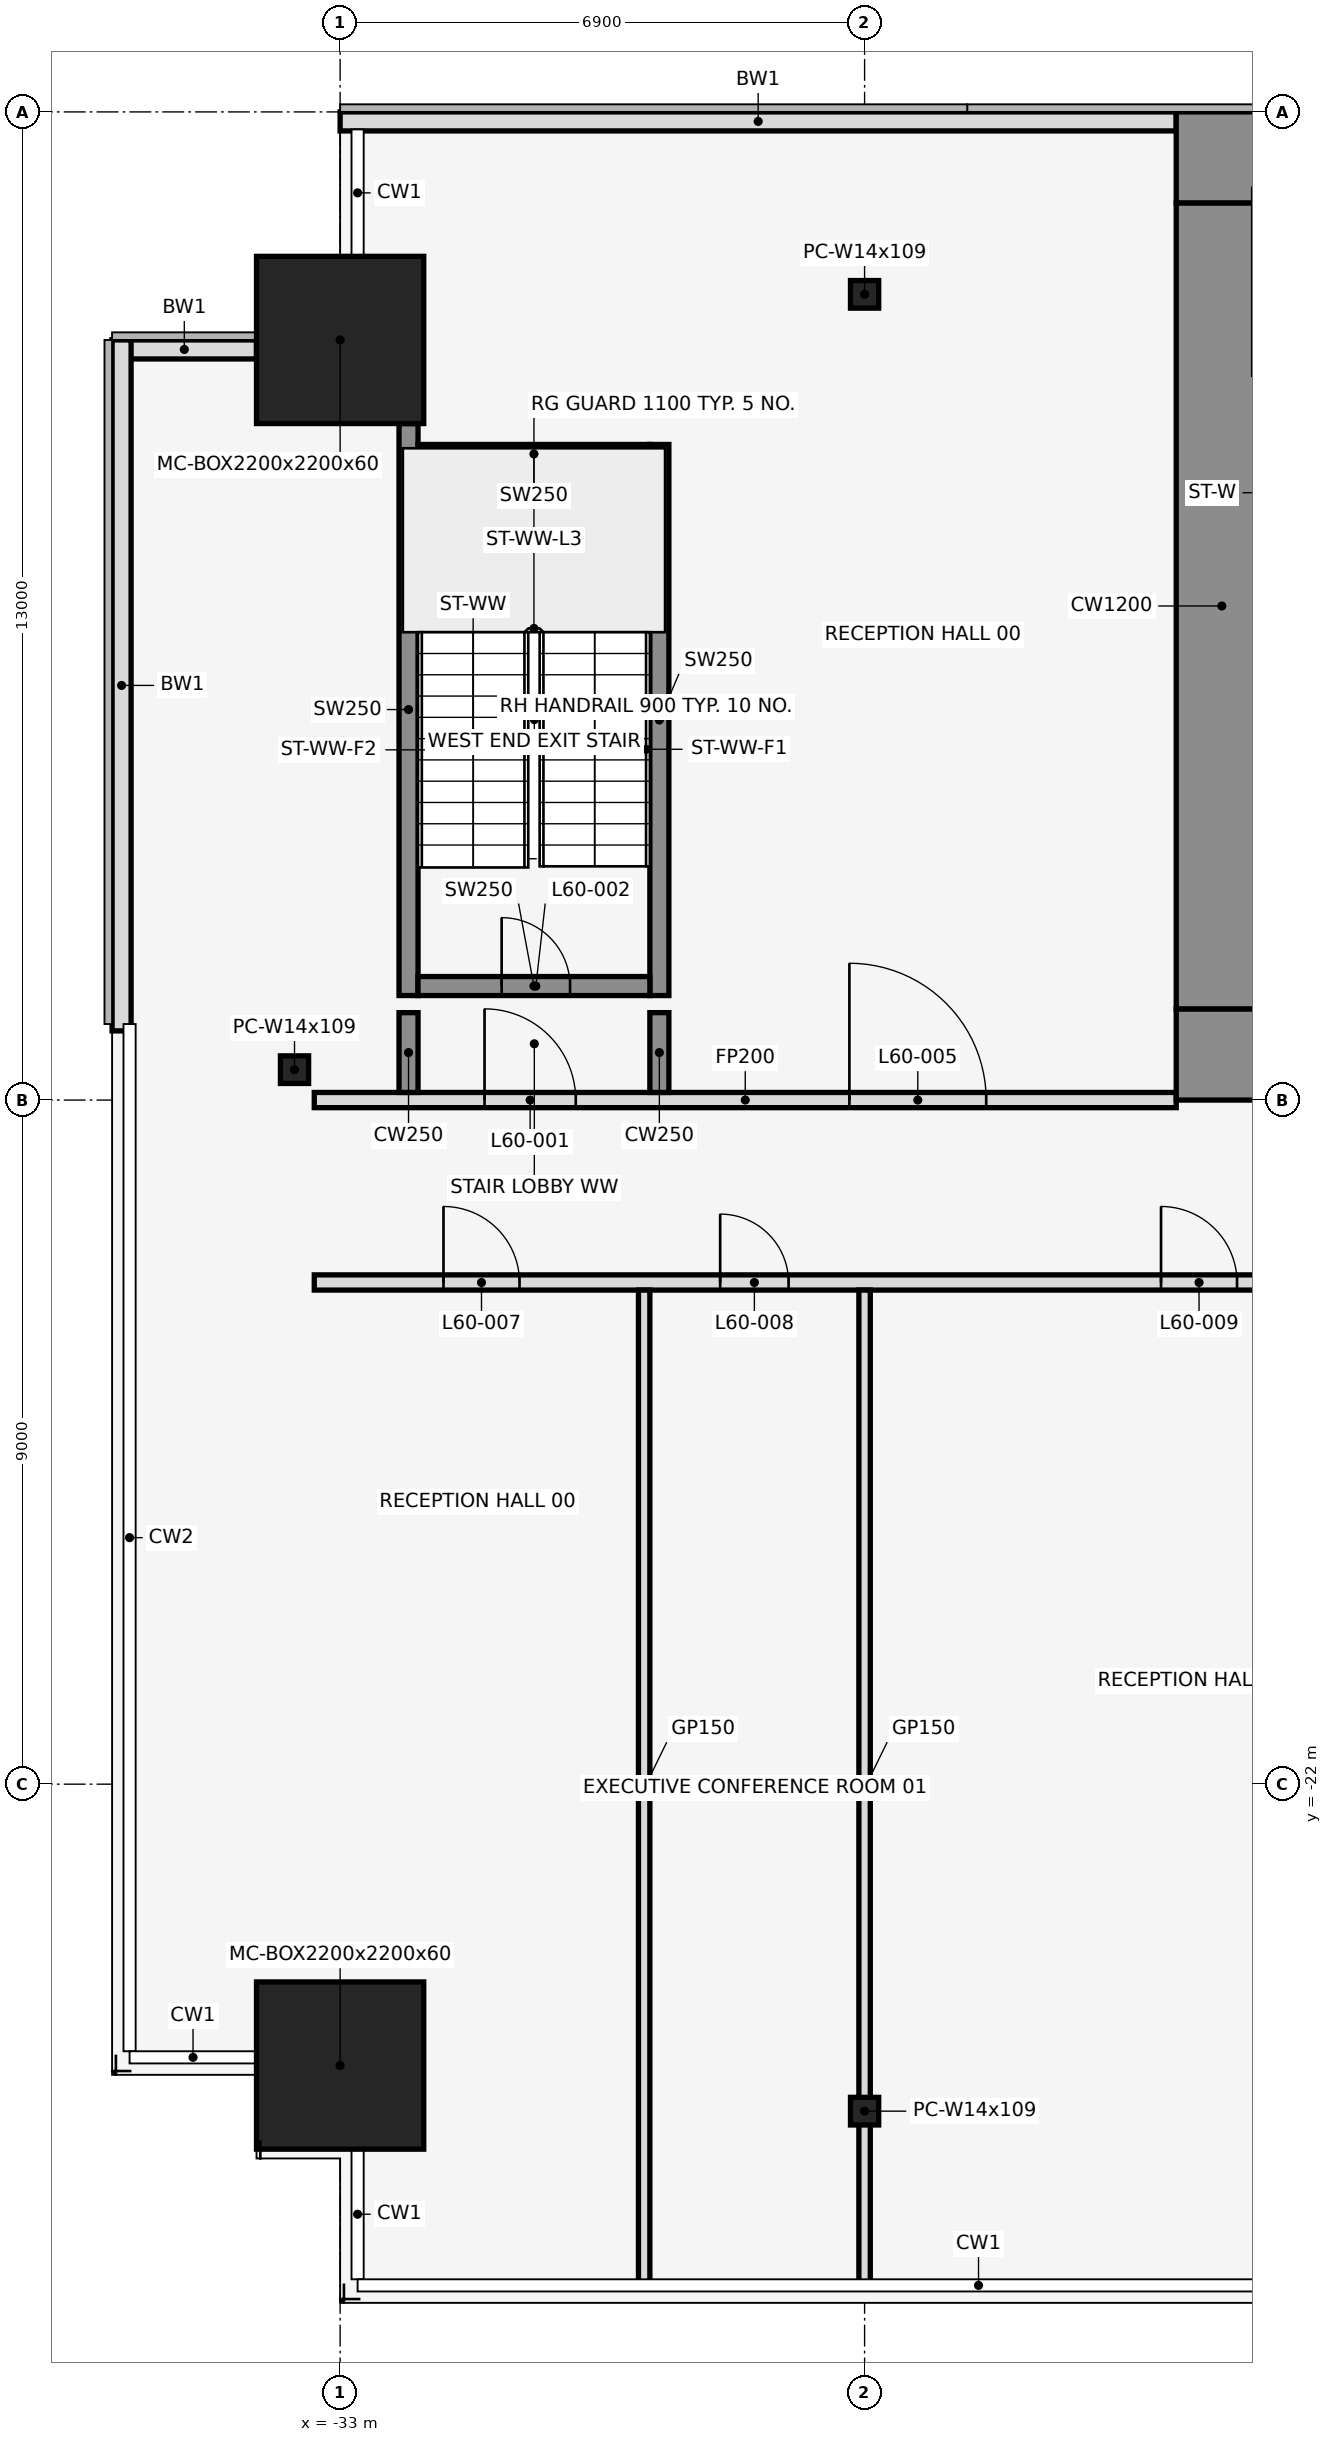
"""IFC4 building model, lengths in metres.
Left out: names, types, materials, properties, quantities, classifications, styles, units other than length and angle.
Written with IfcOpenShell. Run it as: python <this file> out.ifc"""

import sys

from ifc_helpers import new_model, si_unit, direction, frame, frame_2d, origin, origin_2d, place, context, subcontext, project, spatial, rectangle, hollow_rectangle, i_section, extrude, element, fill, save


model = new_model("IFC4")
c1 = context("Model", 3, precision=1e-05, world=origin(), true_north=direction((0.0, 1.0)))
c2 = subcontext(c1, "Body", "Model", "MODEL_VIEW")
j1 = project(units=[si_unit("LENGTHUNIT", "METRE"), si_unit("PLANEANGLEUNIT", "RADIAN")], contexts=[c1])
p1 = place(None, origin())
s1 = spatial("IfcSite", under=j1, at=p1, CompositionType="ELEMENT")
p2 = place(p1, origin())
s2 = spatial("IfcBuilding", under=s1, at=p2, CompositionType="ELEMENT")
p3 = place(p2, frame((0.0, 0.0, 266.6)))
s3 = spatial("IfcBuildingStorey", under=s2, at=p3, CompositionType="ELEMENT", Elevation=266.6)
for number, where, z_axis, x_axis in (
    (1, (-33.0, -25.702, 0.0), (0.0, 0.0, 1.0), (1.0, 0.0, 0.0)),
    (2, (-33.0, -3.0, 0.0), (0.0, 0.0, 1.0), (1.0, 0.0, 0.0)),
):
    element("IfcColumn", number, at=place(p3, frame(where, z_axis=z_axis, x_axis=x_axis)), inside=s3, PredefinedType="COLUMN", context=c2, shape_type="SweptSolid", body=[
        extrude(hollow_rectangle(XDim=2.2, YDim=2.2, WallThickness=0.06, at=origin_2d()), origin(), (0.0, 0.0, 1.0), 4.2),
    ])
for number, where, z_axis, x_axis in (
    (3, (-26.1, -26.302, 0.0), (0.0, 0.0, 1.0), (1.0, 0.0, 0.0)),
    (4, (-26.1, -2.4, 0.0), (0.0, 0.0, 1.0), (1.0, 0.0, 0.0)),
    (5, (-33.6, -12.6, 0.0), (0.0, 0.0, 1.0), (1.0, 0.0, 0.0)),
):
    element("IfcColumn", number, at=place(p3, frame(where, z_axis=z_axis, x_axis=x_axis)), inside=s3, PredefinedType="COLUMN", context=c2, shape_type="SweptSolid", body=[
        extrude(i_section(OverallWidth=0.371, OverallDepth=0.363, WebThickness=0.013, FlangeThickness=0.022, at=origin_2d()), origin(), (0.0, 0.0, 1.0), 4.2),
    ])
p4 = place(p3, frame((-22.0, -0.125, 0.0), z_axis=(0.0, 0.0, 1.0), x_axis=(-1.0, 0.0, 0.0)))
e6 = element("IfcWall", 6, at=p4, inside=s3, PredefinedType="STANDARD", context=c2, shape_type="SweptSolid", body=[
    extrude(rectangle(XDim=11.0, YDim=0.25, at=frame_2d((5.5, 0.0))), origin(), (0.0, 0.0, 1.0), 4.05),
])
p5 = place(p3, frame((-34.1, -3.125, 0.0), z_axis=(0.0, 0.0, 1.0), x_axis=(-1.0, 0.0, 0.0)))
e7 = element("IfcWall", 7, at=p5, inside=s3, PredefinedType="STANDARD", context=c2, shape_type="SweptSolid", body=[
    extrude(rectangle(XDim=1.9, YDim=0.25, at=frame_2d((0.95, 0.0))), origin(), (0.0, 0.0, 1.0), 4.05),
])
p6 = place(p3, frame((-35.875, -3.0, 0.0), z_axis=(0.0, 0.0, 1.0), x_axis=(0.0, -1.0, 0.0)))
e8 = element("IfcWall", 8, at=p6, inside=s3, PredefinedType="STANDARD", context=c2, shape_type="SweptSolid", body=[
    extrude(rectangle(XDim=9.09, YDim=0.25, at=frame_2d((4.545, 0.0))), origin(), (0.0, 0.0, 1.0), 4.05),
])
p7 = place(p3, frame((-32.1, -11.625, 0.0), z_axis=(0.0, 0.0, 1.0), x_axis=(0.0, 1.0, 0.0)))
e9 = element("IfcWall", 9, at=p7, inside=s3, PredefinedType="SHEAR", context=c2, shape_type="SweptSolid", body=[
    extrude(rectangle(XDim=7.525, YDim=0.25, at=frame_2d((3.762, 0.0))), origin(), (0.0, 0.0, 1.0), 4.2),
])
p8 = place(p3, frame((-28.8, -11.625, 0.0), z_axis=(0.0, 0.0, 1.0), x_axis=(0.0, 1.0, 0.0)))
e10 = element("IfcWall", 10, at=p8, inside=s3, PredefinedType="SHEAR", context=c2, shape_type="SweptSolid", body=[
    extrude(rectangle(XDim=7.25, YDim=0.25, at=frame_2d((3.625, 0.0))), origin(), (0.0, 0.0, 1.0), 4.2),
])
p9 = place(p3, frame((-31.975, -11.5, 0.0), z_axis=(0.0, 0.0, 1.0), x_axis=(1.0, 0.0, 0.0)))
e11 = element("IfcWall", 11, at=p9, inside=s3, PredefinedType="SHEAR", context=c2, shape_type="SweptSolid", body=[
    extrude(rectangle(XDim=3.05, YDim=0.25, at=frame_2d((1.525, 0.0))), origin(), (0.0, 0.0, 1.0), 4.2),
])
p10 = place(p9, frame((1.1, 0.0, 0.0)))
e12 = element("IfcOpeningElement", 12, at=p10, cuts=e11, PredefinedType="OPENING", context=c2, shape_type="SweptSolid", body=[
    extrude(rectangle(XDim=0.9, YDim=2.1, at=frame_2d((0.45, 1.05))), frame((0.0, 0.137, 0.0), z_axis=(0.0, -1.0, 0.0), x_axis=(1.0, 0.0, 0.0)), (0.0, 0.0, 1.0), 0.274),
])
p11 = place(p3, frame((-31.975, -4.5, 0.0), z_axis=(0.0, 0.0, 1.0), x_axis=(1.0, 0.0, 0.0)))
e13 = element("IfcWall", 13, at=p11, inside=s3, PredefinedType="SHEAR", context=c2, shape_type="SweptSolid", body=[
    extrude(rectangle(XDim=3.05, YDim=0.25, at=frame_2d((1.525, 0.0))), origin(), (0.0, 0.0, 1.0), 4.2),
])
p12 = place(p3, frame((-33.34, -15.4, 0.0), z_axis=(0.0, 0.0, 1.0), x_axis=(1.0, 0.0, 0.0)))
e14 = element("IfcWall", 14, at=p12, inside=s3, PredefinedType="PARTITIONING", context=c2, shape_type="SweptSolid", body=[
    extrude(rectangle(XDim=31.94, YDim=0.2, at=frame_2d((15.97, 0.0))), origin(), (0.0, 0.0, 1.0), 3.118),
])
p13 = place(p12, frame((1.7, 0.0, 0.0)))
e15 = element("IfcOpeningElement", 15, at=p13, cuts=e14, PredefinedType="OPENING", context=c2, shape_type="SweptSolid", body=[
    extrude(rectangle(XDim=1.0, YDim=2.1, at=frame_2d((0.5, 1.05))), frame((0.0, 0.112, 0.0), z_axis=(0.0, -1.0, 0.0), x_axis=(1.0, 0.0, 0.0)), (0.0, 0.0, 1.0), 0.224),
])
p14 = place(p12, frame((5.34, 0.0, 0.0)))
e16 = element("IfcOpeningElement", 16, at=p14, cuts=e14, PredefinedType="OPENING", context=c2, shape_type="SweptSolid", body=[
    extrude(rectangle(XDim=0.9, YDim=2.1, at=frame_2d((0.45, 1.05))), frame((0.0, 0.112, 0.0), z_axis=(0.0, -1.0, 0.0), x_axis=(1.0, 0.0, 0.0)), (0.0, 0.0, 1.0), 0.224),
])
p15 = place(p12, frame((11.14, 0.0, 0.0)))
e17 = element("IfcOpeningElement", 17, at=p15, cuts=e14, PredefinedType="OPENING", context=c2, shape_type="SweptSolid", body=[
    extrude(rectangle(XDim=1.0, YDim=2.1, at=frame_2d((0.5, 1.05))), frame((0.0, 0.112, 0.0), z_axis=(0.0, -1.0, 0.0), x_axis=(1.0, 0.0, 0.0)), (0.0, 0.0, 1.0), 0.224),
])
p16 = place(p12, frame((18.34, 0.0, 0.0)))
e18 = element("IfcOpeningElement", 18, at=p16, cuts=e14, PredefinedType="OPENING", context=c2, shape_type="SweptSolid", body=[
    extrude(rectangle(XDim=1.0, YDim=2.1, at=frame_2d((0.5, 1.05))), frame((0.0, 0.112, 0.0), z_axis=(0.0, -1.0, 0.0), x_axis=(1.0, 0.0, 0.0)), (0.0, 0.0, 1.0), 0.224),
])
p17 = place(p3, frame((-33.34, -13.0, 0.0), z_axis=(0.0, 0.0, 1.0), x_axis=(1.0, 0.0, 0.0)))
e19 = element("IfcWall", 19, at=p17, inside=s3, PredefinedType="PARTITIONING", context=c2, shape_type="SweptSolid", body=[
    extrude(rectangle(XDim=11.34, YDim=0.2, at=frame_2d((5.67, 0.0))), origin(), (0.0, 0.0, 1.0), 3.118),
])
p18 = place(p17, frame((2.24, 0.0, 0.0)))
e20 = element("IfcOpeningElement", 20, at=p18, cuts=e19, PredefinedType="OPENING", context=c2, shape_type="SweptSolid", body=[
    extrude(rectangle(XDim=1.2, YDim=2.1, at=frame_2d((0.6, 1.05))), frame((0.0, 0.112, 0.0), z_axis=(0.0, -1.0, 0.0), x_axis=(1.0, 0.0, 0.0)), (0.0, 0.0, 1.0), 0.224),
])
p19 = place(p17, frame((7.04, 0.0, 0.0)))
e21 = element("IfcOpeningElement", 21, at=p19, cuts=e19, PredefinedType="OPENING", context=c2, shape_type="SweptSolid", body=[
    extrude(rectangle(XDim=1.8, YDim=2.1, at=frame_2d((0.9, 1.05))), frame((0.0, 0.112, 0.0), z_axis=(0.0, -1.0, 0.0), x_axis=(1.0, 0.0, 0.0)), (0.0, 0.0, 1.0), 0.224),
])
p20 = place(p3, frame((-32.1, -12.9, 0.0), z_axis=(0.0, 0.0, 1.0), x_axis=(0.0, 1.0, 0.0)))
e22 = element("IfcWall", 22, at=p20, inside=s3, PredefinedType="SHEAR", context=c2, shape_type="SweptSolid", body=[
    extrude(rectangle(XDim=1.05, YDim=0.25, at=frame_2d((0.525, 0.0))), origin(), (0.0, 0.0, 1.0), 4.2),
])
p21 = place(p3, frame((-29.0, -28.61, 0.0), z_axis=(0.0, 0.0, 1.0), x_axis=(0.0, 1.0, 0.0)))
e23 = element("IfcWall", 23, at=p21, inside=s3, PredefinedType="PARTITIONING", context=c2, shape_type="SweptSolid", body=[
    extrude(rectangle(XDim=13.11, YDim=0.15, at=frame_2d((6.555, 0.0))), origin(), (0.0, 0.0, 1.0), 3.118),
])
p22 = place(p3, frame((-28.8, -12.9, 0.0), z_axis=(0.0, 0.0, 1.0), x_axis=(0.0, 1.0, 0.0)))
e24 = element("IfcWall", 24, at=p22, inside=s3, PredefinedType="SHEAR", context=c2, shape_type="SweptSolid", body=[
    extrude(rectangle(XDim=1.05, YDim=0.25, at=frame_2d((0.525, 0.0))), origin(), (0.0, 0.0, 1.0), 4.2),
])
p23 = place(p3, frame((-26.1, -28.61, 0.0), z_axis=(0.0, 0.0, 1.0), x_axis=(0.0, 1.0, 0.0)))
e25 = element("IfcWall", 25, at=p23, inside=s3, PredefinedType="PARTITIONING", context=c2, shape_type="SweptSolid", body=[
    extrude(rectangle(XDim=13.11, YDim=0.15, at=frame_2d((6.555, 0.0))), origin(), (0.0, 0.0, 1.0), 3.118),
])
p24 = place(p3, frame((-22.0, -0.6, 0.0), z_axis=(0.0, 0.0, 1.0), x_axis=(1.0, 0.0, 0.0)))
e26 = element("IfcWall", 26, at=p24, inside=s3, PredefinedType="SHEAR", context=c2, shape_type="SweptSolid", body=[
    extrude(rectangle(XDim=44.0, YDim=1.2, at=frame_2d((22.0, 0.0))), origin(), (0.0, 0.0, 1.0), 4.2),
])
p25 = place(p24, frame((18.55, 0.0, 0.0)))
e27 = element("IfcOpeningElement", 27, at=p25, cuts=e26, PredefinedType="OPENING", context=c2, shape_type="SweptSolid", body=[
    extrude(rectangle(XDim=0.9, YDim=2.1, at=frame_2d((0.45, 1.05))), frame((0.0, 0.612, 0.0), z_axis=(0.0, -1.0, 0.0), x_axis=(1.0, 0.0, 0.0)), (0.0, 0.0, 1.0), 1.224),
])
p26 = place(p24, frame((24.55, 0.0, 0.0)))
e28 = element("IfcOpeningElement", 28, at=p26, cuts=e26, PredefinedType="OPENING", context=c2, shape_type="SweptSolid", body=[
    extrude(rectangle(XDim=0.9, YDim=2.1, at=frame_2d((0.45, 1.05))), frame((0.0, 0.612, 0.0), z_axis=(0.0, -1.0, 0.0), x_axis=(1.0, 0.0, 0.0)), (0.0, 0.0, 1.0), 1.224),
])
p27 = place(p3, frame((-22.0, -12.4, 0.0), z_axis=(0.0, 0.0, 1.0), x_axis=(1.0, 0.0, 0.0)))
e29 = element("IfcWall", 29, at=p27, inside=s3, PredefinedType="SHEAR", context=c2, shape_type="SweptSolid", body=[
    extrude(rectangle(XDim=44.0, YDim=1.2, at=frame_2d((22.0, 0.0))), origin(), (0.0, 0.0, 1.0), 4.2),
])
p28 = place(p27, frame((2.2, 0.0, 0.0)))
e30 = element("IfcOpeningElement", 30, at=p28, cuts=e29, PredefinedType="OPENING", context=c2, shape_type="SweptSolid", body=[
    extrude(rectangle(XDim=1.2, YDim=2.1, at=frame_2d((0.6, 1.05))), frame((0.0, 0.612, 0.0), z_axis=(0.0, -1.0, 0.0), x_axis=(1.0, 0.0, 0.0)), (0.0, 0.0, 1.0), 1.224),
])
p29 = place(p27, frame((21.4, 0.0, 0.0)))
e31 = element("IfcOpeningElement", 31, at=p29, cuts=e29, PredefinedType="OPENING", context=c2, shape_type="SweptSolid", body=[
    extrude(rectangle(XDim=1.2, YDim=2.1, at=frame_2d((0.6, 1.05))), frame((0.0, 0.612, 0.0), z_axis=(0.0, -1.0, 0.0), x_axis=(1.0, 0.0, 0.0)), (0.0, 0.0, 1.0), 1.224),
])
p30 = place(p27, frame((40.6, 0.0, 0.0)))
e32 = element("IfcOpeningElement", 32, at=p30, cuts=e29, PredefinedType="OPENING", context=c2, shape_type="SweptSolid", body=[
    extrude(rectangle(XDim=1.2, YDim=2.1, at=frame_2d((0.6, 1.05))), frame((0.0, 0.612, 0.0), z_axis=(0.0, -1.0, 0.0), x_axis=(1.0, 0.0, 0.0)), (0.0, 0.0, 1.0), 1.224),
])
p31 = place(p27, frame((16.0, 0.0, 0.0)))
e33 = element("IfcOpeningElement", 33, at=p31, cuts=e29, PredefinedType="OPENING", context=c2, shape_type="SweptSolid", body=[
    extrude(rectangle(XDim=1.8, YDim=2.1, at=frame_2d((0.9, 1.05))), frame((0.0, 0.612, 0.0), z_axis=(0.0, -1.0, 0.0), x_axis=(1.0, 0.0, 0.0)), (0.0, 0.0, 1.0), 1.224),
])
p32 = place(p27, frame((6.3, 0.0, 0.0)))
e34 = element("IfcOpeningElement", 34, at=p32, cuts=e29, PredefinedType="OPENING", context=c2, shape_type="SweptSolid", body=[
    extrude(rectangle(XDim=1.2, YDim=2.1, at=frame_2d((0.6, 1.05))), frame((0.0, 0.612, 0.0), z_axis=(0.0, -1.0, 0.0), x_axis=(1.0, 0.0, 0.0)), (0.0, 0.0, 1.0), 1.224),
])
p33 = place(p27, frame((26.2, 0.0, 0.0)))
e35 = element("IfcOpeningElement", 35, at=p33, cuts=e29, PredefinedType="OPENING", context=c2, shape_type="SweptSolid", body=[
    extrude(rectangle(XDim=1.8, YDim=2.1, at=frame_2d((0.9, 1.05))), frame((0.0, 0.612, 0.0), z_axis=(0.0, -1.0, 0.0), x_axis=(1.0, 0.0, 0.0)), (0.0, 0.0, 1.0), 1.224),
])
p34 = place(p27, frame((36.5, 0.0, 0.0)))
e36 = element("IfcOpeningElement", 36, at=p34, cuts=e29, PredefinedType="OPENING", context=c2, shape_type="SweptSolid", body=[
    extrude(rectangle(XDim=1.2, YDim=2.1, at=frame_2d((0.6, 1.05))), frame((0.0, 0.612, 0.0), z_axis=(0.0, -1.0, 0.0), x_axis=(1.0, 0.0, 0.0)), (0.0, 0.0, 1.0), 1.224),
])
p35 = place(p3, frame((-21.4, -11.8, 0.0), z_axis=(0.0, 0.0, 1.0), x_axis=(0.0, 1.0, 0.0)))
e37 = element("IfcWall", 37, at=p35, inside=s3, PredefinedType="SHEAR", context=c2, shape_type="SweptSolid", body=[
    extrude(rectangle(XDim=10.6, YDim=1.2, at=frame_2d((5.3, 0.0))), origin(), (0.0, 0.0, 1.0), 4.2),
])
p36 = place(p18, origin())
e38 = element("IfcDoor", 38, at=p36, inside=s3, OperationType="SINGLE_SWING_LEFT", PredefinedType="DOOR", context=c2, shape_type="SweptSolid", body=[
    extrude(rectangle(XDim=1.2, YDim=2.1, at=frame_2d((0.6, 1.05))), frame((0.0, 0.025, 0.0), z_axis=(0.0, -1.0, 0.0), x_axis=(1.0, 0.0, 0.0)), (0.0, 0.0, 1.0), 0.05),
])
fill(e20, e38)
p37 = place(p10, origin())
e39 = element("IfcDoor", 39, at=p37, inside=s3, OperationType="SINGLE_SWING_LEFT", PredefinedType="DOOR", context=c2, shape_type="SweptSolid", body=[
    extrude(rectangle(XDim=0.9, YDim=2.1, at=frame_2d((0.45, 1.05))), frame((0.0, 0.025, 0.0), z_axis=(0.0, -1.0, 0.0), x_axis=(1.0, 0.0, 0.0)), (0.0, 0.0, 1.0), 0.05),
])
fill(e12, e39)
p38 = place(p19, origin())
e40 = element("IfcDoor", 40, at=p38, inside=s3, OperationType="SINGLE_SWING_LEFT", PredefinedType="DOOR", context=c2, shape_type="SweptSolid", body=[
    extrude(rectangle(XDim=1.8, YDim=2.1, at=frame_2d((0.9, 1.05))), frame((0.0, 0.025, 0.0), z_axis=(0.0, -1.0, 0.0), x_axis=(1.0, 0.0, 0.0)), (0.0, 0.0, 1.0), 0.05),
])
fill(e21, e40)
p39 = place(p13, frame((1.0, 0.0, 0.0), z_axis=(0.0, 0.0, 1.0), x_axis=(-1.0, 0.0, 0.0)))
e41 = element("IfcDoor", 41, at=p39, inside=s3, OperationType="SINGLE_SWING_LEFT", PredefinedType="DOOR", context=c2, shape_type="SweptSolid", body=[
    extrude(rectangle(XDim=1.0, YDim=2.1, at=frame_2d((0.5, 1.05))), frame((0.0, 0.025, 0.0), z_axis=(0.0, -1.0, 0.0), x_axis=(1.0, 0.0, 0.0)), (0.0, 0.0, 1.0), 0.05),
])
fill(e15, e41)
p40 = place(p14, frame((0.9, 0.0, 0.0), z_axis=(0.0, 0.0, 1.0), x_axis=(-1.0, 0.0, 0.0)))
e42 = element("IfcDoor", 42, at=p40, inside=s3, OperationType="SINGLE_SWING_RIGHT", PredefinedType="DOOR", context=c2, shape_type="SweptSolid", body=[
    extrude(rectangle(XDim=0.9, YDim=2.1, at=frame_2d((0.45, 1.05))), frame((0.0, 0.025, 0.0), z_axis=(0.0, -1.0, 0.0), x_axis=(1.0, 0.0, 0.0)), (0.0, 0.0, 1.0), 0.05),
])
fill(e16, e42)
p41 = place(p15, frame((1.0, 0.0, 0.0), z_axis=(0.0, 0.0, 1.0), x_axis=(-1.0, 0.0, 0.0)))
e43 = element("IfcDoor", 43, at=p41, inside=s3, OperationType="SINGLE_SWING_RIGHT", PredefinedType="DOOR", context=c2, shape_type="SweptSolid", body=[
    extrude(rectangle(XDim=1.0, YDim=2.1, at=frame_2d((0.5, 1.05))), frame((0.0, 0.025, 0.0), z_axis=(0.0, -1.0, 0.0), x_axis=(1.0, 0.0, 0.0)), (0.0, 0.0, 1.0), 0.05),
])
fill(e17, e43)
save(model, sys.argv[1])
